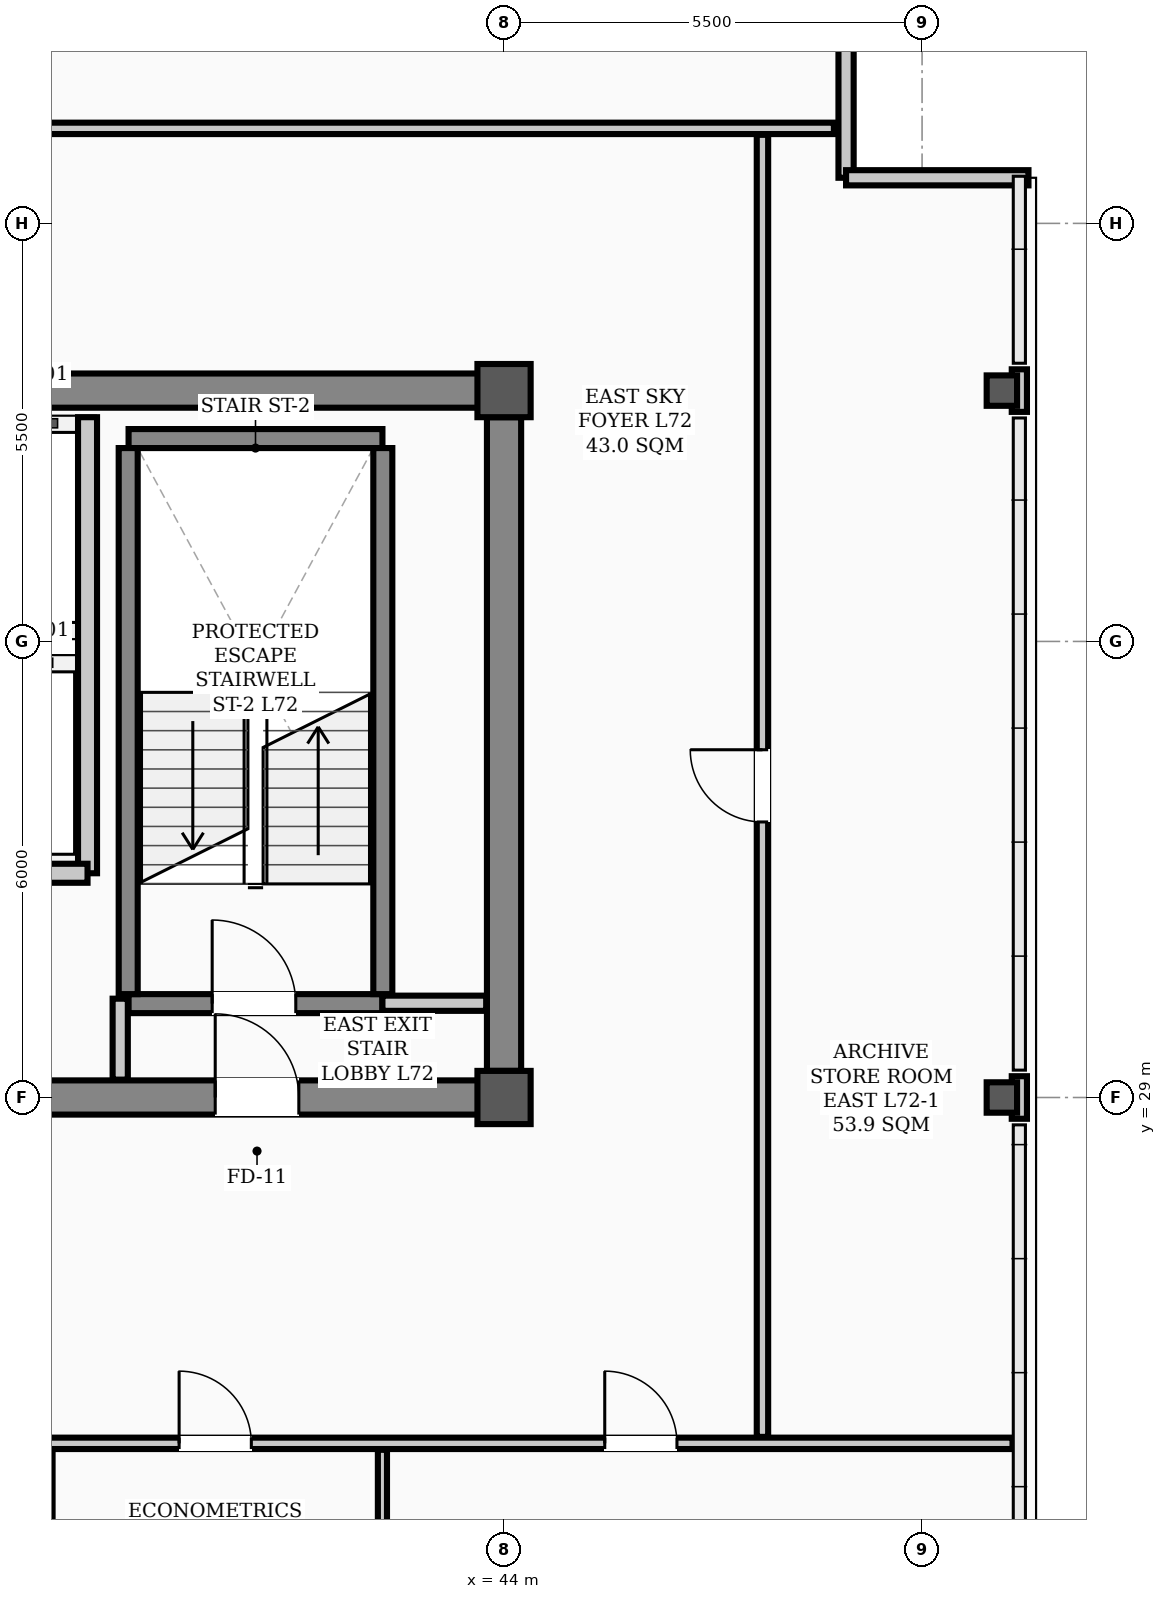
"""IFC4 building model, lengths in metres.
Left out: names, types, materials, properties, quantities, classifications, styles, units other than length and angle.
Written with IfcOpenShell. Run it as: python <this file> out.ifc"""

import sys

from ifc_helpers import new_model, si_unit, direction, frame, frame_2d, origin, origin_2d, place, context, subcontext, project, spatial, rectangle, hollow_rectangle, extrude, element, fill, save


model = new_model("IFC4")
c1 = context("Model", 3, precision=1e-05, world=origin(), true_north=direction((0.0, 1.0)))
c2 = subcontext(c1, "Body", "Model", "MODEL_VIEW")
j1 = project(units=[si_unit("LENGTHUNIT", "METRE"), si_unit("PLANEANGLEUNIT", "RADIAN")], contexts=[c1])
p1 = place(None, origin())
s1 = spatial("IfcSite", under=j1, at=p1, CompositionType="ELEMENT")
p2 = place(p1, origin())
s2 = spatial("IfcBuilding", under=s1, at=p2, CompositionType="ELEMENT")
p3 = place(p2, frame((0.0, 0.0, 289.1)))
s3 = spatial("IfcBuildingStorey", under=s2, at=p3, CompositionType="ELEMENT", Elevation=289.1)
for number, where, z_axis, x_axis in (
    (1, (44.0, 29.0, 0.0), (0.0, 0.0, 1.0), (1.0, 0.0, 0.0)),
    (2, (44.0, 38.3, 0.0), (0.0, 0.0, 1.0), (1.0, 0.0, 0.0)),
):
    element("IfcColumn", number, at=place(p3, frame(where, z_axis=z_axis, x_axis=x_axis)), inside=s3, PredefinedType="COLUMN", context=c2, shape_type="SweptSolid", body=[
        extrude(hollow_rectangle(XDim=0.7, YDim=0.7, WallThickness=0.028, InnerFilletRadius=0.014, OuterFilletRadius=0.042, at=origin_2d()), origin(), (0.0, 0.0, 1.0), 3.9),
    ])
for number, where, z_axis, x_axis in (
    (3, (50.55, 29.0, 0.0), (0.0, 0.0, 1.0), (1.0, 0.0, 0.0)),
    (4, (50.55, 38.3, 0.0), (0.0, 0.0, 1.0), (1.0, 0.0, 0.0)),
):
    element("IfcColumn", number, at=place(p3, frame(where, z_axis=z_axis, x_axis=x_axis)), inside=s3, PredefinedType="COLUMN", context=c2, shape_type="SweptSolid", body=[
        extrude(hollow_rectangle(XDim=0.4, YDim=0.4, WallThickness=0.02, InnerFilletRadius=0.02, OuterFilletRadius=0.04, at=origin_2d()), origin(), (0.0, 0.0, 1.0), 3.9),
    ])
for number, where, z_axis, x_axis in (
    (5, (50.78, 28.72, 0.0), (0.0, 0.0, 1.0), (0.0, 1.0, 0.0)),
    (6, (50.78, 38.02, 0.0), (0.0, 0.0, 1.0), (0.0, 1.0, 0.0)),
):
    element("IfcWall", number, at=place(p3, frame(where, z_axis=z_axis, x_axis=x_axis)), inside=s3, PredefinedType="PARAPET", context=c2, shape_type="SweptSolid", body=[
        extrude(rectangle(XDim=0.56, YDim=0.2, at=frame_2d((0.28, 0.0))), origin(), (0.0, 0.0, 1.0), 1.2),
    ])
for number, where, z_axis, x_axis in (
    (7, (48.5, 43.5, 0.0), (0.0, 0.0, 1.0), (0.0, -1.0, 0.0)),
    (8, (48.5, 41.1, 0.0), (0.0, 0.0, 1.0), (1.0, 0.0, 0.0)),
):
    element("IfcWall", number, at=place(p3, frame(where, z_axis=z_axis, x_axis=x_axis)), inside=s3, PredefinedType="PARAPET", context=c2, shape_type="SweptSolid", body=[
        extrude(rectangle(XDim=2.4, YDim=0.2, at=frame_2d((1.2, 0.0))), origin(), (0.0, 0.0, 1.0), 1.2),
    ])
p4 = place(p3, frame((13.5, 29.0, 0.0), z_axis=(0.0, 0.0, 1.0), x_axis=(1.0, 0.0, 0.0)))
e9 = element("IfcWall", 9, at=p4, inside=s3, PredefinedType="SHEAR", context=c2, shape_type="SweptSolid", body=[
    extrude(rectangle(XDim=30.5, YDim=0.45, at=frame_2d((15.25, 0.0))), origin(), (0.0, 0.0, 1.0), 3.72),
])
p5 = place(p4, frame((1.75, 0.0, 0.0)))
e10 = element("IfcOpeningElement", 10, at=p5, cuts=e9, PredefinedType="OPENING", context=c2, shape_type="SweptSolid", body=[
    extrude(rectangle(XDim=1.1, YDim=2.08, at=frame_2d((0.55, 1.04))), frame((0.0, 0.235, 0.0), z_axis=(0.0, -1.0, 0.0), x_axis=(1.0, 0.0, 0.0)), (0.0, 0.0, 1.0), 0.47),
])
p6 = place(p4, frame((26.7, 0.0, 0.0)))
e11 = element("IfcOpeningElement", 11, at=p6, cuts=e9, PredefinedType="OPENING", context=c2, shape_type="SweptSolid", body=[
    extrude(rectangle(XDim=1.1, YDim=2.08, at=frame_2d((0.55, 1.04))), frame((0.0, 0.235, 0.0), z_axis=(0.0, -1.0, 0.0), x_axis=(1.0, 0.0, 0.0)), (0.0, 0.0, 1.0), 0.47),
])
p7 = place(p4, frame((6.8, 0.0, 0.0)))
e12 = element("IfcOpeningElement", 12, at=p7, cuts=e9, PredefinedType="OPENING", context=c2, shape_type="SweptSolid", body=[
    extrude(rectangle(XDim=1.1, YDim=2.08, at=frame_2d((0.55, 1.04))), frame((0.0, 0.235, 0.0), z_axis=(0.0, -1.0, 0.0), x_axis=(1.0, 0.0, 0.0)), (0.0, 0.0, 1.0), 0.47),
])
p8 = place(p4, frame((13.2, 0.0, 0.0)))
e13 = element("IfcOpeningElement", 13, at=p8, cuts=e9, PredefinedType="OPENING", context=c2, shape_type="SweptSolid", body=[
    extrude(rectangle(XDim=1.6, YDim=2.08, at=frame_2d((0.8, 1.04))), frame((0.0, 0.235, 0.0), z_axis=(0.0, -1.0, 0.0), x_axis=(1.0, 0.0, 0.0)), (0.0, 0.0, 1.0), 0.47),
])
p9 = place(p4, frame((19.53, 0.0, 0.0)))
e14 = element("IfcOpeningElement", 14, at=p9, cuts=e9, PredefinedType="OPENING", context=c2, shape_type="SweptSolid", body=[
    extrude(rectangle(XDim=0.9, YDim=2.08, at=frame_2d((0.45, 1.04))), frame((0.0, 0.235, 0.0), z_axis=(0.0, -1.0, 0.0), x_axis=(1.0, 0.0, 0.0)), (0.0, 0.0, 1.0), 0.47),
])
p10 = place(p4, frame((21.57, 0.0, 0.0)))
e15 = element("IfcOpeningElement", 15, at=p10, cuts=e9, PredefinedType="OPENING", context=c2, shape_type="SweptSolid", body=[
    extrude(rectangle(XDim=0.9, YDim=2.08, at=frame_2d((0.45, 1.04))), frame((0.0, 0.235, 0.0), z_axis=(0.0, -1.0, 0.0), x_axis=(1.0, 0.0, 0.0)), (0.0, 0.0, 1.0), 0.47),
])
p11 = place(p3, frame((13.5, 38.3, 0.0), z_axis=(0.0, 0.0, 1.0), x_axis=(1.0, 0.0, 0.0)))
e16 = element("IfcWall", 16, at=p11, inside=s3, PredefinedType="SHEAR", context=c2, shape_type="SweptSolid", body=[
    extrude(rectangle(XDim=30.5, YDim=0.45, at=frame_2d((15.25, 0.0))), origin(), (0.0, 0.0, 1.0), 3.72),
])
p12 = place(p3, frame((44.0, 29.35, 0.0), z_axis=(0.0, 0.0, 1.0), x_axis=(0.0, 1.0, 0.0)))
e17 = element("IfcWall", 17, at=p12, inside=s3, PredefinedType="SHEAR", context=c2, shape_type="SweptSolid", body=[
    extrude(rectangle(XDim=8.6, YDim=0.45, at=frame_2d((4.3, 0.0))), origin(), (0.0, 0.0, 1.0), 3.72),
])
p13 = place(p3, frame((39.06, 30.235, 0.0), z_axis=(0.0, 0.0, 1.0), x_axis=(1.0, 0.0, 0.0)))
e18 = element("IfcWall", 18, at=p13, inside=s3, PredefinedType="STANDARD", context=c2, shape_type="SweptSolid", body=[
    extrude(rectangle(XDim=3.34, YDim=0.25, at=frame_2d((1.67, 0.0))), origin(), (0.0, 0.0, 1.0), 3.72),
])
p14 = place(p13, frame((1.1, 0.0, 0.0)))
e19 = element("IfcOpeningElement", 19, at=p14, cuts=e18, PredefinedType="OPENING", context=c2, shape_type="SweptSolid", body=[
    extrude(rectangle(XDim=1.1, YDim=2.08, at=frame_2d((0.55, 1.04))), frame((0.0, 0.135, 0.0), z_axis=(0.0, -1.0, 0.0), x_axis=(1.0, 0.0, 0.0)), (0.0, 0.0, 1.0), 0.27),
])
p15 = place(p3, frame((39.06, 37.669, 0.0), z_axis=(0.0, 0.0, 1.0), x_axis=(1.0, 0.0, 0.0)))
e20 = element("IfcWall", 20, at=p15, inside=s3, PredefinedType="STANDARD", context=c2, shape_type="SweptSolid", body=[
    extrude(rectangle(XDim=3.34, YDim=0.25, at=frame_2d((1.67, 0.0))), origin(), (0.0, 0.0, 1.0), 3.72),
])
for number, where, z_axis, x_axis in (
    (21, (39.055, 30.36, 0.0), (0.0, 0.0, 1.0), (0.0, 1.0, 0.0)),
    (22, (42.405, 30.36, 0.0), (0.0, 0.0, 1.0), (0.0, 1.0, 0.0)),
):
    element("IfcWall", number, at=place(p3, frame(where, z_axis=z_axis, x_axis=x_axis)), inside=s3, PredefinedType="STANDARD", context=c2, shape_type="SweptSolid", body=[
        extrude(rectangle(XDim=7.184, YDim=0.25, at=frame_2d((3.592, 0.0))), origin(), (0.0, 0.0, 1.0), 3.72),
    ])
p16 = place(p3, frame((38.52, 31.95, 0.0), z_axis=(0.0, 0.0, 1.0), x_axis=(0.0, 1.0, 0.0)))
e23 = element("IfcWall", 23, at=p16, inside=s3, PredefinedType="STANDARD", context=c2, shape_type="SweptSolid", body=[
    extrude(rectangle(XDim=6.0, YDim=0.25, at=frame_2d((3.0, 0.0))), origin(), (0.0, 0.0, 1.0), 3.4),
])
p17 = place(p3, frame((36.62, 31.95, 0.0), z_axis=(0.0, 0.0, 1.0), x_axis=(1.0, 0.0, 0.0)))
e24 = element("IfcWall", 24, at=p17, inside=s3, PredefinedType="STANDARD", context=c2, shape_type="SweptSolid", body=[
    extrude(rectangle(XDim=1.9, YDim=0.25, at=frame_2d((0.95, 0.0))), origin(), (0.0, 0.0, 1.0), 3.48),
])
p18 = place(p3, frame((42.4, 30.24, 0.0), z_axis=(0.0, 0.0, 1.0), x_axis=(1.0, 0.0, 0.0)))
e25 = element("IfcWall", 25, at=p18, inside=s3, PredefinedType="STANDARD", context=c2, shape_type="SweptSolid", body=[
    extrude(rectangle(XDim=1.365, YDim=0.2, at=frame_2d((0.683, 0.0))), origin(), (0.0, 0.0, 1.0), 3.2),
])
p19 = place(p3, frame((12.31, 24.45, 0.0), z_axis=(0.0, 0.0, 1.0), x_axis=(1.0, 0.0, 0.0)))
e26 = element("IfcWall", 26, at=p19, inside=s3, PredefinedType="PARTITIONING", context=c2, shape_type="SweptSolid", body=[
    extrude(rectangle(XDim=38.38, YDim=0.15, at=frame_2d((19.19, 0.0))), origin(), (0.0, 0.0, 1.0), 3.2),
])
p20 = place(p19, frame((3.57, 0.0, 0.0)))
e27 = element("IfcOpeningElement", 27, at=p20, cuts=e26, PredefinedType="OPENING", context=c2, shape_type="SweptSolid", body=[
    extrude(rectangle(XDim=0.95, YDim=2.08, at=frame_2d((0.475, 1.04))), frame((0.0, 0.085, 0.0), z_axis=(0.0, -1.0, 0.0), x_axis=(1.0, 0.0, 0.0)), (0.0, 0.0, 1.0), 0.17),
])
p21 = place(p19, frame((8.915, 0.0, 0.0)))
e28 = element("IfcOpeningElement", 28, at=p21, cuts=e26, PredefinedType="OPENING", context=c2, shape_type="SweptSolid", body=[
    extrude(rectangle(XDim=0.95, YDim=2.08, at=frame_2d((0.475, 1.04))), frame((0.0, 0.085, 0.0), z_axis=(0.0, -1.0, 0.0), x_axis=(1.0, 0.0, 0.0)), (0.0, 0.0, 1.0), 0.17),
])
p22 = place(p19, frame((15.415, 0.0, 0.0)))
e29 = element("IfcOpeningElement", 29, at=p22, cuts=e26, PredefinedType="OPENING", context=c2, shape_type="SweptSolid", body=[
    extrude(rectangle(XDim=0.95, YDim=2.08, at=frame_2d((0.475, 1.04))), frame((0.0, 0.085, 0.0), z_axis=(0.0, -1.0, 0.0), x_axis=(1.0, 0.0, 0.0)), (0.0, 0.0, 1.0), 0.17),
])
p23 = place(p19, frame((22.015, 0.0, 0.0)))
e30 = element("IfcOpeningElement", 30, at=p23, cuts=e26, PredefinedType="OPENING", context=c2, shape_type="SweptSolid", body=[
    extrude(rectangle(XDim=0.95, YDim=2.08, at=frame_2d((0.475, 1.04))), frame((0.0, 0.085, 0.0), z_axis=(0.0, -1.0, 0.0), x_axis=(1.0, 0.0, 0.0)), (0.0, 0.0, 1.0), 0.17),
])
p24 = place(p19, frame((27.415, 0.0, 0.0)))
e31 = element("IfcOpeningElement", 31, at=p24, cuts=e26, PredefinedType="OPENING", context=c2, shape_type="SweptSolid", body=[
    extrude(rectangle(XDim=0.95, YDim=2.08, at=frame_2d((0.475, 1.04))), frame((0.0, 0.085, 0.0), z_axis=(0.0, -1.0, 0.0), x_axis=(1.0, 0.0, 0.0)), (0.0, 0.0, 1.0), 0.17),
])
p25 = place(p19, frame((33.015, 0.0, 0.0)))
e32 = element("IfcOpeningElement", 32, at=p25, cuts=e26, PredefinedType="OPENING", context=c2, shape_type="SweptSolid", body=[
    extrude(rectangle(XDim=0.95, YDim=2.08, at=frame_2d((0.475, 1.04))), frame((0.0, 0.085, 0.0), z_axis=(0.0, -1.0, 0.0), x_axis=(1.0, 0.0, 0.0)), (0.0, 0.0, 1.0), 0.17),
])
p26 = place(p3, frame((14.66, 41.75, 0.0), z_axis=(0.0, 0.0, 1.0), x_axis=(1.0, 0.0, 0.0)))
e33 = element("IfcWall", 33, at=p26, inside=s3, PredefinedType="PARTITIONING", context=c2, shape_type="SweptSolid", body=[
    extrude(rectangle(XDim=33.68, YDim=0.15, at=frame_2d((16.84, 0.0))), origin(), (0.0, 0.0, 1.0), 3.2),
])
p27 = place(p3, frame((38.95, 29.235, 0.0), z_axis=(0.0, 0.0, 1.0), x_axis=(0.0, 1.0, 0.0)))
e34 = element("IfcWall", 34, at=p27, inside=s3, PredefinedType="STANDARD", context=c2, shape_type="SweptSolid", body=[
    extrude(rectangle(XDim=1.065, YDim=0.2, at=frame_2d((0.532, 0.0))), origin(), (0.0, 0.0, 1.0), 3.4),
])
p28 = place(p3, frame((47.4, 24.535, 0.0), z_axis=(0.0, 0.0, 1.0), x_axis=(0.0, 1.0, 0.0)))
e35 = element("IfcWall", 35, at=p28, inside=s3, PredefinedType="PARTITIONING", context=c2, shape_type="SweptSolid", body=[
    extrude(rectangle(XDim=17.13, YDim=0.15, at=frame_2d((8.565, 0.0))), origin(), (0.0, 0.0, 1.0), 3.1),
])
p29 = place(p28, frame((8.09, 0.0, 0.0)))
e36 = element("IfcOpeningElement", 36, at=p29, cuts=e35, PredefinedType="OPENING", context=c2, shape_type="SweptSolid", body=[
    extrude(rectangle(XDim=0.95, YDim=2.08, at=frame_2d((0.475, 1.04))), frame((0.0, 0.085, 0.0), z_axis=(0.0, -1.0, 0.0), x_axis=(1.0, 0.0, 0.0)), (0.0, 0.0, 1.0), 0.17),
])
for number, where, z_axis, x_axis in (
    (37, (38.0, 18.71, 0.0), (0.0, 0.0, 1.0), (0.0, 1.0, 0.0)),
    (38, (42.4, 18.71, 0.0), (0.0, 0.0, 1.0), (0.0, 1.0, 0.0)),
):
    element("IfcWall", number, at=place(p3, frame(where, z_axis=z_axis, x_axis=x_axis)), inside=s3, PredefinedType="PARTITIONING", context=c2, shape_type="SweptSolid", body=[
        extrude(rectangle(XDim=5.655, YDim=0.12, at=frame_2d((2.828, 0.0))), origin(), (0.0, 0.0, 1.0), 3.1),
    ])
p30 = place(p14, origin())
e39 = element("IfcDoor", 39, at=p30, inside=s3, OperationType="SINGLE_SWING_LEFT", PredefinedType="DOOR", context=c2, shape_type="SweptSolid", body=[
    extrude(rectangle(XDim=1.1, YDim=2.08, at=frame_2d((0.55, 1.04))), frame((0.0, 0.025, 0.0), z_axis=(0.0, -1.0, 0.0), x_axis=(1.0, 0.0, 0.0)), (0.0, 0.0, 1.0), 0.05),
])
fill(e19, e39)
p31 = place(p6, origin())
e40 = element("IfcDoor", 40, at=p31, inside=s3, OperationType="SINGLE_SWING_LEFT", PredefinedType="DOOR", context=c2, shape_type="SweptSolid", body=[
    extrude(rectangle(XDim=1.1, YDim=2.08, at=frame_2d((0.55, 1.04))), frame((0.0, 0.025, 0.0), z_axis=(0.0, -1.0, 0.0), x_axis=(1.0, 0.0, 0.0)), (0.0, 0.0, 1.0), 0.05),
])
fill(e11, e40)
p32 = place(p24, origin())
e41 = element("IfcDoor", 41, at=p32, inside=s3, OperationType="SINGLE_SWING_LEFT", PredefinedType="DOOR", context=c2, shape_type="SweptSolid", body=[
    extrude(rectangle(XDim=0.95, YDim=2.08, at=frame_2d((0.475, 1.04))), frame((0.0, 0.025, 0.0), z_axis=(0.0, -1.0, 0.0), x_axis=(1.0, 0.0, 0.0)), (0.0, 0.0, 1.0), 0.05),
])
fill(e31, e41)
p33 = place(p25, origin())
e42 = element("IfcDoor", 42, at=p33, inside=s3, OperationType="SINGLE_SWING_LEFT", PredefinedType="DOOR", context=c2, shape_type="SweptSolid", body=[
    extrude(rectangle(XDim=0.95, YDim=2.08, at=frame_2d((0.475, 1.04))), frame((0.0, 0.025, 0.0), z_axis=(0.0, -1.0, 0.0), x_axis=(1.0, 0.0, 0.0)), (0.0, 0.0, 1.0), 0.05),
])
fill(e32, e42)
p34 = place(p29, origin())
e43 = element("IfcDoor", 43, at=p34, inside=s3, OperationType="SINGLE_SWING_RIGHT", PredefinedType="DOOR", context=c2, shape_type="SweptSolid", body=[
    extrude(rectangle(XDim=0.95, YDim=2.08, at=frame_2d((0.475, 1.04))), frame((0.0, 0.025, 0.0), z_axis=(0.0, -1.0, 0.0), x_axis=(1.0, 0.0, 0.0)), (0.0, 0.0, 1.0), 0.05),
])
fill(e36, e43)
save(model, sys.argv[1])
